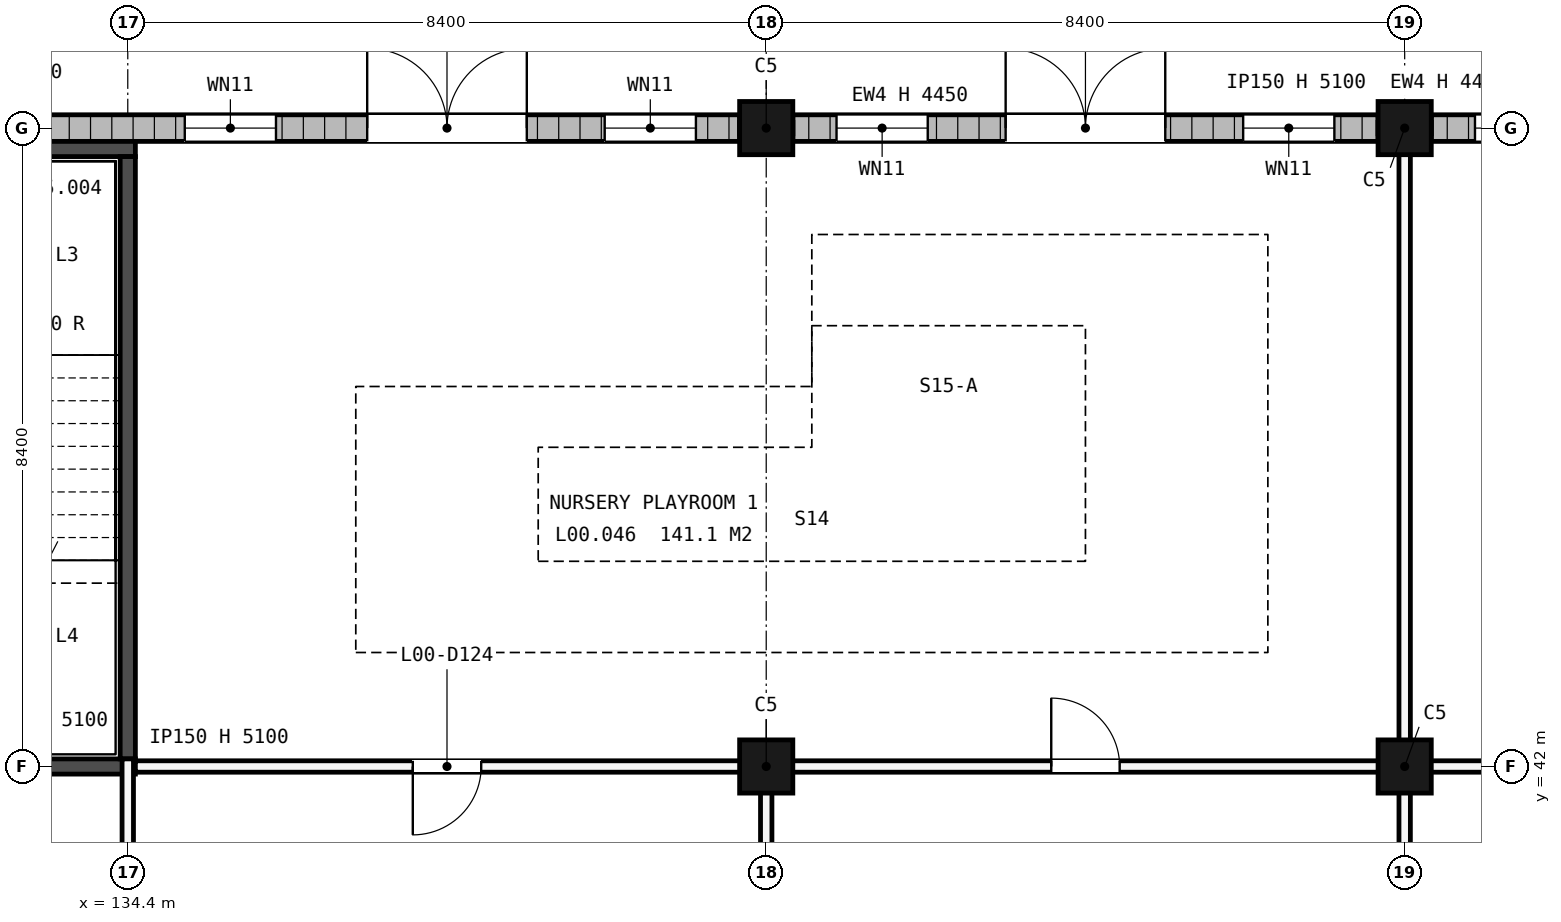
"""IFC4 building model, lengths in metres.
Left out: names, types, materials, properties, quantities, classifications, styles, units other than length and angle.
Written with IfcOpenShell. Run it as: python <this file> out.ifc"""

import sys

from ifc_helpers import new_model, si_unit, direction, frame, frame_2d, origin, origin_2d, place, context, subcontext, project, spatial, rectangle, extrude, element, fill, save


model = new_model("IFC4")
c1 = context("Model", 3, precision=1e-05, world=origin(), true_north=direction((0.0, 1.0)))
c2 = subcontext(c1, "Body", "Model", "MODEL_VIEW")
j1 = project(units=[si_unit("LENGTHUNIT", "METRE"), si_unit("PLANEANGLEUNIT", "RADIAN")], contexts=[c1])
p1 = place(None, origin())
s1 = spatial("IfcSite", under=j1, at=p1, CompositionType="ELEMENT")
p2 = place(p1, origin())
s2 = spatial("IfcBuilding", under=s1, at=p2, CompositionType="ELEMENT")
p3 = place(p2, origin())
s3 = spatial("IfcBuildingStorey", under=s2, at=p3, CompositionType="ELEMENT", Elevation=0.0)
for number, where, z_axis, x_axis in (
    (1, (142.8, 42.0, -0.3), (0.0, 0.0, 1.0), (1.0, 0.0, 0.0)),
    (2, (142.8, 50.4, -0.3), (0.0, 0.0, 1.0), (1.0, 0.0, 0.0)),
    (3, (151.2, 42.0, -0.3), (0.0, 0.0, 1.0), (1.0, 0.0, 0.0)),
    (4, (151.2, 50.4, -0.3), (0.0, 0.0, 1.0), (1.0, 0.0, 0.0)),
):
    element("IfcColumn", number, at=place(p3, frame(where, z_axis=z_axis, x_axis=x_axis)), inside=s3, PredefinedType="COLUMN", context=c2, shape_type="SweptSolid", body=[
        extrude(rectangle(XDim=0.7, YDim=0.7, at=origin_2d()), origin(), (0.0, 0.0, 1.0), 5.4),
    ])
p4 = place(p3, frame((129.85, 50.4, 0.0), z_axis=(0.0, 0.0, 1.0), x_axis=(1.0, 0.0, 0.0)))
e5 = element("IfcWall", 5, at=p4, inside=s3, PredefinedType="STANDARD", context=c2, shape_type="SweptSolid", body=[
    extrude(rectangle(XDim=12.6, YDim=0.35, at=frame_2d((6.3, 0.0))), origin(), (0.0, 0.0, 1.0), 5.1),
])
p5 = place(p4, frame((7.7, 0.0, 0.0)))
e6 = element("IfcOpeningElement", 6, at=p5, cuts=e5, PredefinedType="OPENING", context=c2, shape_type="SweptSolid", body=[
    extrude(rectangle(XDim=2.1, YDim=2.2, at=frame_2d((1.05, 1.1))), frame((0.0, 0.185, 0.0), z_axis=(0.0, -1.0, 0.0), x_axis=(1.0, 0.0, 0.0)), (0.0, 0.0, 1.0), 0.37),
])
p6 = place(p4, frame((5.3, 0.0, 0.6)))
e7 = element("IfcOpeningElement", 7, at=p6, cuts=e5, PredefinedType="OPENING", context=c2, shape_type="SweptSolid", body=[
    extrude(rectangle(XDim=1.2, YDim=1.8, at=frame_2d((0.6, 0.9))), frame((0.0, 0.185, 0.0), z_axis=(0.0, -1.0, 0.0), x_axis=(1.0, 0.0, 0.0)), (0.0, 0.0, 1.0), 0.37),
])
p7 = place(p4, frame((10.825, 0.0, 0.6)))
e8 = element("IfcOpeningElement", 8, at=p7, cuts=e5, PredefinedType="OPENING", context=c2, shape_type="SweptSolid", body=[
    extrude(rectangle(XDim=1.2, YDim=1.8, at=frame_2d((0.6, 0.9))), frame((0.0, 0.185, 0.0), z_axis=(0.0, -1.0, 0.0), x_axis=(1.0, 0.0, 0.0)), (0.0, 0.0, 1.0), 0.37),
])
p8 = place(p3, frame((143.15, 50.4, 0.0), z_axis=(0.0, 0.0, 1.0), x_axis=(1.0, 0.0, 0.0)))
e9 = element("IfcWall", 9, at=p8, inside=s3, PredefinedType="STANDARD", context=c2, shape_type="SweptSolid", body=[
    extrude(rectangle(XDim=7.7, YDim=0.35, at=frame_2d((3.85, 0.0))), origin(), (0.0, 0.0, 1.0), 4.45),
])
p9 = place(p8, frame((2.8, 0.0, 0.0)))
e10 = element("IfcOpeningElement", 10, at=p9, cuts=e9, PredefinedType="OPENING", context=c2, shape_type="SweptSolid", body=[
    extrude(rectangle(XDim=2.1, YDim=2.2, at=frame_2d((1.05, 1.1))), frame((0.0, 0.185, 0.0), z_axis=(0.0, -1.0, 0.0), x_axis=(1.0, 0.0, 0.0)), (0.0, 0.0, 1.0), 0.37),
])
p10 = place(p8, frame((0.575, 0.0, 0.6)))
e11 = element("IfcOpeningElement", 11, at=p10, cuts=e9, PredefinedType="OPENING", context=c2, shape_type="SweptSolid", body=[
    extrude(rectangle(XDim=1.2, YDim=1.8, at=frame_2d((0.6, 0.9))), frame((0.0, 0.185, 0.0), z_axis=(0.0, -1.0, 0.0), x_axis=(1.0, 0.0, 0.0)), (0.0, 0.0, 1.0), 0.37),
])
p11 = place(p8, frame((5.925, 0.0, 0.6)))
e12 = element("IfcOpeningElement", 12, at=p11, cuts=e9, PredefinedType="OPENING", context=c2, shape_type="SweptSolid", body=[
    extrude(rectangle(XDim=1.2, YDim=1.8, at=frame_2d((0.6, 0.9))), frame((0.0, 0.185, 0.0), z_axis=(0.0, -1.0, 0.0), x_axis=(1.0, 0.0, 0.0)), (0.0, 0.0, 1.0), 0.37),
])
p12 = place(p3, frame((151.55, 50.4, 0.0), z_axis=(0.0, 0.0, 1.0), x_axis=(1.0, 0.0, 0.0)))
e13 = element("IfcWall", 13, at=p12, inside=s3, PredefinedType="STANDARD", context=c2, shape_type="SweptSolid", body=[
    extrude(rectangle(XDim=7.7, YDim=0.35, at=frame_2d((3.85, 0.0))), origin(), (0.0, 0.0, 1.0), 4.45),
])
p13 = place(p12, frame((2.8, 0.0, 0.0)))
e14 = element("IfcOpeningElement", 14, at=p13, cuts=e13, PredefinedType="OPENING", context=c2, shape_type="SweptSolid", body=[
    extrude(rectangle(XDim=2.1, YDim=2.2, at=frame_2d((1.05, 1.1))), frame((0.0, 0.185, 0.0), z_axis=(0.0, -1.0, 0.0), x_axis=(1.0, 0.0, 0.0)), (0.0, 0.0, 1.0), 0.37),
])
p14 = place(p12, frame((0.575, 0.0, 0.6)))
e15 = element("IfcOpeningElement", 15, at=p14, cuts=e13, PredefinedType="OPENING", context=c2, shape_type="SweptSolid", body=[
    extrude(rectangle(XDim=1.2, YDim=1.8, at=frame_2d((0.6, 0.9))), frame((0.0, 0.185, 0.0), z_axis=(0.0, -1.0, 0.0), x_axis=(1.0, 0.0, 0.0)), (0.0, 0.0, 1.0), 0.37),
])
p15 = place(p12, frame((5.925, 0.0, 0.6)))
e16 = element("IfcOpeningElement", 16, at=p15, cuts=e13, PredefinedType="OPENING", context=c2, shape_type="SweptSolid", body=[
    extrude(rectangle(XDim=1.2, YDim=1.8, at=frame_2d((0.6, 0.9))), frame((0.0, 0.185, 0.0), z_axis=(0.0, -1.0, 0.0), x_axis=(1.0, 0.0, 0.0)), (0.0, 0.0, 1.0), 0.37),
])
for number, where, z_axis, x_axis in (
    (17, (130.1, 42.0, -0.3), (0.0, 0.0, 1.0), (1.0, 0.0, 0.0)),
    (18, (130.1, 50.125, -0.3), (0.0, 0.0, 1.0), (1.0, 0.0, 0.0)),
):
    element("IfcWall", number, at=place(p3, frame(where, z_axis=z_axis, x_axis=x_axis)), inside=s3, PredefinedType="SHEAR", context=c2, shape_type="SweptSolid", body=[
        extrude(rectangle(XDim=4.4, YDim=0.2, at=frame_2d((2.2, 0.0))), origin(), (0.0, 0.0, 1.0), 5.4),
    ])
p16 = place(p3, frame((134.4, 42.1, -0.3), z_axis=(0.0, 0.0, 1.0), x_axis=(0.0, 1.0, 0.0)))
e19 = element("IfcWall", 19, at=p16, inside=s3, PredefinedType="SHEAR", context=c2, shape_type="SweptSolid", body=[
    extrude(rectangle(XDim=7.925, YDim=0.2, at=frame_2d((3.962, 0.0))), origin(), (0.0, 0.0, 1.0), 5.4),
])
p17 = place(p3, frame((134.5, 42.0, 0.0), z_axis=(0.0, 0.0, 1.0), x_axis=(1.0, 0.0, 0.0)))
e20 = element("IfcWall", 20, at=p17, inside=s3, PredefinedType="PARTITIONING", context=c2, shape_type="SweptSolid", body=[
    extrude(rectangle(XDim=8.63, YDim=0.15, at=frame_2d((4.315, 0.0))), origin(), (0.0, 0.0, 1.0), 5.1),
])
p18 = place(p17, frame((3.65, 0.0, 0.0)))
e21 = element("IfcOpeningElement", 21, at=p18, cuts=e20, PredefinedType="OPENING", context=c2, shape_type="SweptSolid", body=[
    extrude(rectangle(XDim=0.9, YDim=2.25, at=frame_2d((0.45, 1.125))), frame((0.0, 0.085, 0.0), z_axis=(0.0, -1.0, 0.0), x_axis=(1.0, 0.0, 0.0)), (0.0, 0.0, 1.0), 0.17),
])
p19 = place(p3, frame((143.13, 42.0, 0.0), z_axis=(0.0, 0.0, 1.0), x_axis=(1.0, 0.0, 0.0)))
e22 = element("IfcWall", 22, at=p19, inside=s3, PredefinedType="PARTITIONING", context=c2, shape_type="SweptSolid", body=[
    extrude(rectangle(XDim=16.14, YDim=0.15, at=frame_2d((8.07, 0.0))), origin(), (0.0, 0.0, 1.0), 4.3),
])
p20 = place(p19, frame((3.42, 0.0, 0.0)))
e23 = element("IfcOpeningElement", 23, at=p20, cuts=e22, PredefinedType="OPENING", context=c2, shape_type="SweptSolid", body=[
    extrude(rectangle(XDim=0.9, YDim=2.1, at=frame_2d((0.45, 1.05))), frame((0.0, 0.085, 0.0), z_axis=(0.0, -1.0, 0.0), x_axis=(1.0, 0.0, 0.0)), (0.0, 0.0, 1.0), 0.17),
])
p21 = place(p19, frame((13.92, 0.0, 0.0)))
e24 = element("IfcOpeningElement", 24, at=p21, cuts=e22, PredefinedType="OPENING", context=c2, shape_type="SweptSolid", body=[
    extrude(rectangle(XDim=0.9, YDim=2.25, at=frame_2d((0.45, 1.125))), frame((0.0, 0.085, 0.0), z_axis=(0.0, -1.0, 0.0), x_axis=(1.0, 0.0, 0.0)), (0.0, 0.0, 1.0), 0.17),
])
for number, where, z_axis, x_axis in (
    (25, (142.45, 50.4, 0.0), (0.0, 0.0, 1.0), (1.0, 0.0, 0.0)),
    (26, (150.85, 50.4, 0.0), (0.0, 0.0, 1.0), (1.0, 0.0, 0.0)),
):
    element("IfcWall", number, at=place(p3, frame(where, z_axis=z_axis, x_axis=x_axis)), inside=s3, PredefinedType="PARTITIONING", context=c2, shape_type="SweptSolid", body=[
        extrude(rectangle(XDim=0.7, YDim=0.15, at=frame_2d((0.35, 0.0))), origin(), (0.0, 0.0, 1.0), 5.1),
    ])
p22 = place(p3, frame((134.4, 33.27, 0.0), z_axis=(0.0, 0.0, 1.0), x_axis=(0.0, 1.0, 0.0)))
e27 = element("IfcWall", 27, at=p22, inside=s3, PredefinedType="PARTITIONING", context=c2, shape_type="SweptSolid", body=[
    extrude(rectangle(XDim=8.83, YDim=0.15, at=frame_2d((4.415, 0.0))), origin(), (0.0, 0.0, 1.0), 5.1),
])
p23 = place(p3, frame((142.8, 27.675, 0.0), z_axis=(0.0, 0.0, 1.0), x_axis=(0.0, 1.0, 0.0)))
e28 = element("IfcWall", 28, at=p23, inside=s3, PredefinedType="PARTITIONING", context=c2, shape_type="SweptSolid", body=[
    extrude(rectangle(XDim=14.25, YDim=0.15, at=frame_2d((7.125, 0.0))), origin(), (0.0, 0.0, 1.0), 4.3),
])
p24 = place(p3, frame((151.2, 27.675, 0.0), z_axis=(0.0, 0.0, 1.0), x_axis=(0.0, 1.0, 0.0)))
e29 = element("IfcWall", 29, at=p24, inside=s3, PredefinedType="PARTITIONING", context=c2, shape_type="SweptSolid", body=[
    extrude(rectangle(XDim=22.65, YDim=0.15, at=frame_2d((11.325, 0.0))), origin(), (0.0, 0.0, 1.0), 4.3),
])
p25 = place(p5, origin())
e30 = element("IfcDoor", 30, at=p25, inside=s3, OperationType="SINGLE_SWING_LEFT", PredefinedType="DOOR", context=c2, shape_type="SweptSolid", body=[
    extrude(rectangle(XDim=2.1, YDim=0.013, at=frame_2d((1.05, 0.007))), frame((0.0, 0.115, 0.0), z_axis=(0.0, -1.0, 0.0), x_axis=(1.0, 0.0, 0.0)), (0.0, 0.0, 1.0), 0.23),
    extrude(rectangle(XDim=0.075, YDim=2.112, at=frame_2d((0.038, 1.069))), frame((0.0, 0.125, 0.0), z_axis=(0.0, -1.0, 0.0), x_axis=(1.0, 0.0, 0.0)), (0.0, 0.0, 1.0), 0.25),
    extrude(rectangle(XDim=0.075, YDim=2.112, at=frame_2d((2.062, 1.069))), frame((0.0, 0.125, 0.0), z_axis=(0.0, -1.0, 0.0), x_axis=(1.0, 0.0, 0.0)), (0.0, 0.0, 1.0), 0.25),
    extrude(rectangle(XDim=2.1, YDim=0.075, at=frame_2d((1.05, 2.163))), frame((0.0, 0.115, 0.0), z_axis=(0.0, -1.0, 0.0), x_axis=(1.0, 0.0, 0.0)), (0.0, 0.0, 1.0), 0.23),
    extrude(rectangle(XDim=1.95, YDim=0.3, at=frame_2d((1.05, 0.163))), frame((0.0, 0.02, 0.0), z_axis=(0.0, -1.0, 0.0), x_axis=(1.0, 0.0, 0.0)), (0.0, 0.0, 1.0), 0.04),
    extrude(rectangle(XDim=1.95, YDim=0.12, at=frame_2d((1.05, 2.065))), frame((0.0, 0.02, 0.0), z_axis=(0.0, -1.0, 0.0), x_axis=(1.0, 0.0, 0.0)), (0.0, 0.0, 1.0), 0.04),
    extrude(rectangle(XDim=0.09, YDim=1.692, at=frame_2d((0.12, 1.159))), frame((0.0, 0.025, 0.0), z_axis=(0.0, -1.0, 0.0), x_axis=(1.0, 0.0, 0.0)), (0.0, 0.0, 1.0), 0.05),
    extrude(rectangle(XDim=0.18, YDim=1.692, at=frame_2d((1.05, 1.159))), frame((0.0, 0.025, 0.0), z_axis=(0.0, -1.0, 0.0), x_axis=(1.0, 0.0, 0.0)), (0.0, 0.0, 1.0), 0.05),
    extrude(rectangle(XDim=0.09, YDim=1.692, at=frame_2d((1.98, 1.159))), frame((0.0, 0.025, 0.0), z_axis=(0.0, -1.0, 0.0), x_axis=(1.0, 0.0, 0.0)), (0.0, 0.0, 1.0), 0.05),
    extrude(rectangle(XDim=0.795, YDim=1.692, at=frame_2d((0.562, 1.159))), frame((0.0, 0.012, 0.0), z_axis=(0.0, -1.0, 0.0), x_axis=(1.0, 0.0, 0.0)), (0.0, 0.0, 1.0), 0.024),
    extrude(rectangle(XDim=0.795, YDim=1.692, at=frame_2d((1.538, 1.159))), frame((0.0, 0.012, 0.0), z_axis=(0.0, -1.0, 0.0), x_axis=(1.0, 0.0, 0.0)), (0.0, 0.0, 1.0), 0.024),
])
fill(e6, e30)
p26 = place(p6, origin())
e31 = element("IfcWindow", 31, at=p26, inside=s3, PartitioningType="SINGLE_PANEL", PredefinedType="WINDOW", context=c2, shape_type="SweptSolid", body=[
    extrude(rectangle(XDim=1.2, YDim=1.8, at=frame_2d((0.6, 0.9))), frame((0.0, 0.03, 0.0), z_axis=(0.0, -1.0, 0.0), x_axis=(1.0, 0.0, 0.0)), (0.0, 0.0, 1.0), 0.06),
])
fill(e7, e31)
p27 = place(p7, origin())
e32 = element("IfcWindow", 32, at=p27, inside=s3, PartitioningType="SINGLE_PANEL", PredefinedType="WINDOW", context=c2, shape_type="SweptSolid", body=[
    extrude(rectangle(XDim=1.2, YDim=1.8, at=frame_2d((0.6, 0.9))), frame((0.0, 0.03, 0.0), z_axis=(0.0, -1.0, 0.0), x_axis=(1.0, 0.0, 0.0)), (0.0, 0.0, 1.0), 0.06),
])
fill(e8, e32)
p28 = place(p9, origin())
e33 = element("IfcDoor", 33, at=p28, inside=s3, OperationType="SINGLE_SWING_LEFT", PredefinedType="DOOR", context=c2, shape_type="SweptSolid", body=[
    extrude(rectangle(XDim=2.1, YDim=0.013, at=frame_2d((1.05, 0.007))), frame((0.0, 0.115, 0.0), z_axis=(0.0, -1.0, 0.0), x_axis=(1.0, 0.0, 0.0)), (0.0, 0.0, 1.0), 0.23),
    extrude(rectangle(XDim=0.075, YDim=2.112, at=frame_2d((0.038, 1.069))), frame((0.0, 0.125, 0.0), z_axis=(0.0, -1.0, 0.0), x_axis=(1.0, 0.0, 0.0)), (0.0, 0.0, 1.0), 0.25),
    extrude(rectangle(XDim=0.075, YDim=2.112, at=frame_2d((2.062, 1.069))), frame((0.0, 0.125, 0.0), z_axis=(0.0, -1.0, 0.0), x_axis=(1.0, 0.0, 0.0)), (0.0, 0.0, 1.0), 0.25),
    extrude(rectangle(XDim=2.1, YDim=0.075, at=frame_2d((1.05, 2.163))), frame((0.0, 0.115, 0.0), z_axis=(0.0, -1.0, 0.0), x_axis=(1.0, 0.0, 0.0)), (0.0, 0.0, 1.0), 0.23),
    extrude(rectangle(XDim=1.95, YDim=0.3, at=frame_2d((1.05, 0.163))), frame((0.0, 0.02, 0.0), z_axis=(0.0, -1.0, 0.0), x_axis=(1.0, 0.0, 0.0)), (0.0, 0.0, 1.0), 0.04),
    extrude(rectangle(XDim=1.95, YDim=0.12, at=frame_2d((1.05, 2.065))), frame((0.0, 0.02, 0.0), z_axis=(0.0, -1.0, 0.0), x_axis=(1.0, 0.0, 0.0)), (0.0, 0.0, 1.0), 0.04),
    extrude(rectangle(XDim=0.09, YDim=1.692, at=frame_2d((0.12, 1.159))), frame((0.0, 0.025, 0.0), z_axis=(0.0, -1.0, 0.0), x_axis=(1.0, 0.0, 0.0)), (0.0, 0.0, 1.0), 0.05),
    extrude(rectangle(XDim=0.18, YDim=1.692, at=frame_2d((1.05, 1.159))), frame((0.0, 0.025, 0.0), z_axis=(0.0, -1.0, 0.0), x_axis=(1.0, 0.0, 0.0)), (0.0, 0.0, 1.0), 0.05),
    extrude(rectangle(XDim=0.09, YDim=1.692, at=frame_2d((1.98, 1.159))), frame((0.0, 0.025, 0.0), z_axis=(0.0, -1.0, 0.0), x_axis=(1.0, 0.0, 0.0)), (0.0, 0.0, 1.0), 0.05),
    extrude(rectangle(XDim=0.795, YDim=1.692, at=frame_2d((0.562, 1.159))), frame((0.0, 0.012, 0.0), z_axis=(0.0, -1.0, 0.0), x_axis=(1.0, 0.0, 0.0)), (0.0, 0.0, 1.0), 0.024),
    extrude(rectangle(XDim=0.795, YDim=1.692, at=frame_2d((1.538, 1.159))), frame((0.0, 0.012, 0.0), z_axis=(0.0, -1.0, 0.0), x_axis=(1.0, 0.0, 0.0)), (0.0, 0.0, 1.0), 0.024),
])
fill(e10, e33)
p29 = place(p10, origin())
e34 = element("IfcWindow", 34, at=p29, inside=s3, PartitioningType="SINGLE_PANEL", PredefinedType="WINDOW", context=c2, shape_type="SweptSolid", body=[
    extrude(rectangle(XDim=1.2, YDim=1.8, at=frame_2d((0.6, 0.9))), frame((0.0, 0.03, 0.0), z_axis=(0.0, -1.0, 0.0), x_axis=(1.0, 0.0, 0.0)), (0.0, 0.0, 1.0), 0.06),
])
fill(e11, e34)
p30 = place(p11, origin())
e35 = element("IfcWindow", 35, at=p30, inside=s3, PartitioningType="SINGLE_PANEL", PredefinedType="WINDOW", context=c2, shape_type="SweptSolid", body=[
    extrude(rectangle(XDim=1.2, YDim=1.8, at=frame_2d((0.6, 0.9))), frame((0.0, 0.03, 0.0), z_axis=(0.0, -1.0, 0.0), x_axis=(1.0, 0.0, 0.0)), (0.0, 0.0, 1.0), 0.06),
])
fill(e12, e35)
p31 = place(p14, origin())
e36 = element("IfcWindow", 36, at=p31, inside=s3, PartitioningType="SINGLE_PANEL", PredefinedType="WINDOW", context=c2, shape_type="SweptSolid", body=[
    extrude(rectangle(XDim=1.2, YDim=1.8, at=frame_2d((0.6, 0.9))), frame((0.0, 0.03, 0.0), z_axis=(0.0, -1.0, 0.0), x_axis=(1.0, 0.0, 0.0)), (0.0, 0.0, 1.0), 0.06),
])
fill(e15, e36)
p32 = place(p20, origin())
e37 = element("IfcDoor", 37, at=p32, inside=s3, OperationType="SINGLE_SWING_RIGHT", PredefinedType="DOOR", context=c2, shape_type="SweptSolid", body=[
    extrude(rectangle(XDim=0.9, YDim=2.1, at=frame_2d((0.45, 1.05))), frame((0.0, 0.025, 0.0), z_axis=(0.0, -1.0, 0.0), x_axis=(1.0, 0.0, 0.0)), (0.0, 0.0, 1.0), 0.05),
])
fill(e23, e37)
p33 = place(p18, origin())
e38 = element("IfcDoor", 38, at=p33, inside=s3, OperationType="SINGLE_SWING_LEFT", PredefinedType="DOOR", context=c2, shape_type="SweptSolid", body=[
    extrude(rectangle(XDim=0.9, YDim=2.25, at=frame_2d((0.45, 1.125))), frame((0.0, 0.025, 0.0), z_axis=(0.0, -1.0, 0.0), x_axis=(1.0, 0.0, 0.0)), (0.0, 0.0, 1.0), 0.05),
])
fill(e21, e38)
save(model, sys.argv[1])
